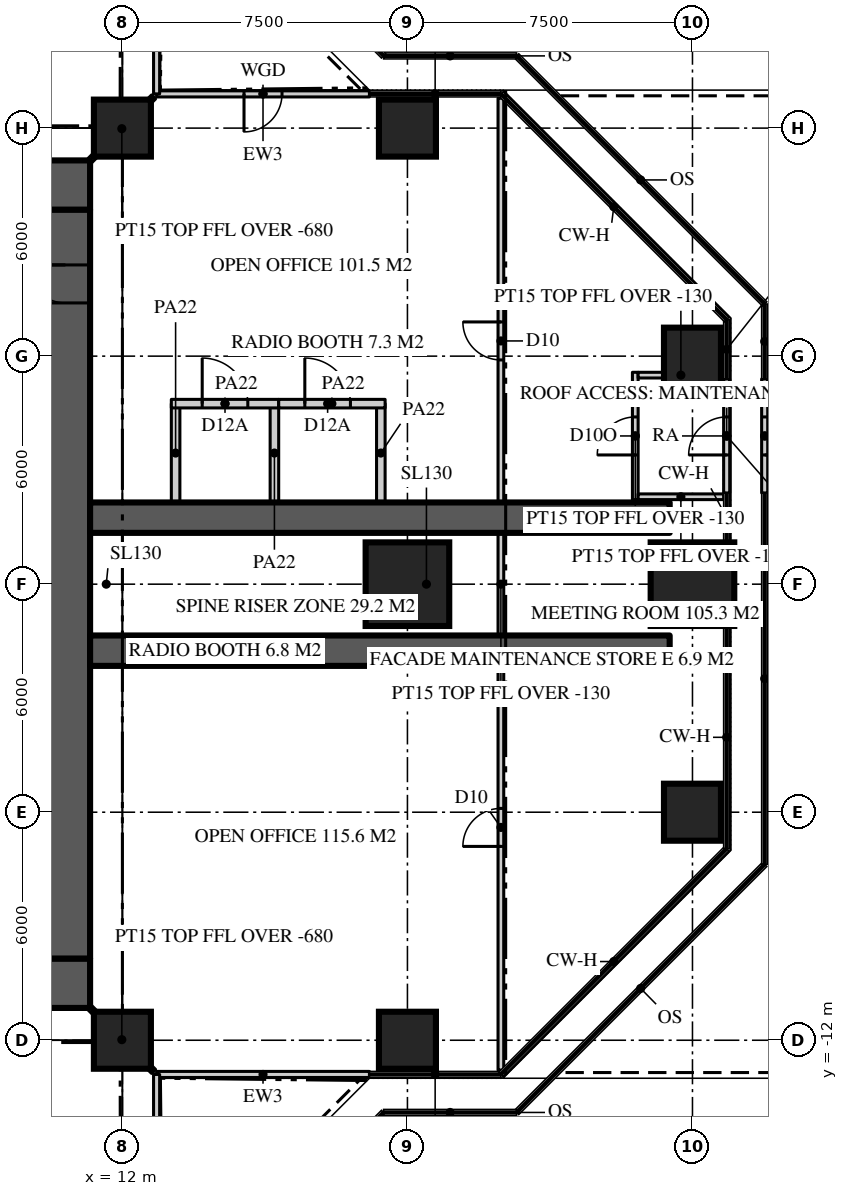
"""IFC4 building model, lengths in metres.
Left out: names, types, materials, properties, quantities, classifications, styles, units other than length and angle.
Written with IfcOpenShell. Run it as: python <this file> out.ifc"""

import sys

from ifc_helpers import new_model, si_unit, direction, frame, frame_2d, origin, origin_2d, place, context, subcontext, project, spatial, rectangle, extrude, element, fill, save


model = new_model("IFC4")
c1 = context("Model", 3, precision=1e-05, world=origin(), true_north=direction((0.0, 1.0)))
c2 = subcontext(c1, "Body", "Model", "MODEL_VIEW")
j1 = project(units=[si_unit("LENGTHUNIT", "METRE"), si_unit("PLANEANGLEUNIT", "RADIAN")], contexts=[c1])
p1 = place(None, origin())
s1 = spatial("IfcSite", under=j1, at=p1, CompositionType="ELEMENT")
p2 = place(p1, origin())
s2 = spatial("IfcBuilding", under=s1, at=p2, CompositionType="ELEMENT")
p3 = place(p2, frame((0.0, 0.0, 204.9)))
s3 = spatial("IfcBuildingStorey", under=s2, at=p3, CompositionType="ELEMENT", Elevation=204.9)
p4 = place(p3, frame((-11.15, 10.5, 0.0), z_axis=(0.0, 0.0, 1.0), x_axis=(1.0, 0.0, 0.0)))
e1 = element("IfcWall", 1, at=p4, inside=s3, PredefinedType="SHEAR", context=c2, shape_type="SweptSolid", body=[
    extrude(rectangle(XDim=22.3, YDim=1.3, at=frame_2d((11.15, 0.0))), origin(), (0.0, 0.0, 1.0), 3.9),
])
p5 = place(p4, frame((4.25, 0.0, 0.0)))
e2 = element("IfcOpeningElement", 2, at=p5, cuts=e1, PredefinedType="OPENING", context=c2, shape_type="SweptSolid", body=[
    extrude(rectangle(XDim=1.8, YDim=2.2, at=frame_2d((0.9, 1.1))), frame((0.0, 0.66, 0.0), z_axis=(0.0, -1.0, 0.0), x_axis=(1.0, 0.0, 0.0)), (0.0, 0.0, 1.0), 1.32),
])
p6 = place(p4, frame((16.25, 0.0, 0.0)))
e3 = element("IfcOpeningElement", 3, at=p6, cuts=e1, PredefinedType="OPENING", context=c2, shape_type="SweptSolid", body=[
    extrude(rectangle(XDim=1.8, YDim=2.2, at=frame_2d((0.9, 1.1))), frame((0.0, 0.66, 0.0), z_axis=(0.0, -1.0, 0.0), x_axis=(1.0, 0.0, 0.0)), (0.0, 0.0, 1.0), 1.32),
])
p7 = place(p3, frame((11.15, -10.5, 0.0), z_axis=(0.0, 0.0, 1.0), x_axis=(-1.0, 0.0, 0.0)))
e4 = element("IfcWall", 4, at=p7, inside=s3, PredefinedType="SHEAR", context=c2, shape_type="SweptSolid", body=[
    extrude(rectangle(XDim=22.3, YDim=1.3, at=frame_2d((11.15, 0.0))), origin(), (0.0, 0.0, 1.0), 3.9),
])
p8 = place(p7, frame((16.25, 0.0, 0.0)))
e5 = element("IfcOpeningElement", 5, at=p8, cuts=e4, PredefinedType="OPENING", context=c2, shape_type="SweptSolid", body=[
    extrude(rectangle(XDim=1.8, YDim=2.2, at=frame_2d((0.9, 1.1))), frame((0.0, 0.66, 0.0), z_axis=(0.0, -1.0, 0.0), x_axis=(1.0, 0.0, 0.0)), (0.0, 0.0, 1.0), 1.32),
])
p9 = place(p7, frame((4.25, 0.0, 0.0)))
e6 = element("IfcOpeningElement", 6, at=p9, cuts=e4, PredefinedType="OPENING", context=c2, shape_type="SweptSolid", body=[
    extrude(rectangle(XDim=1.8, YDim=2.2, at=frame_2d((0.9, 1.1))), frame((0.0, 0.66, 0.0), z_axis=(0.0, -1.0, 0.0), x_axis=(1.0, 0.0, 0.0)), (0.0, 0.0, 1.0), 1.32),
])
p10 = place(p3, frame((10.5, -9.85, 0.0), z_axis=(0.0, 0.0, 1.0), x_axis=(0.0, 1.0, 0.0)))
e7 = element("IfcWall", 7, at=p10, inside=s3, PredefinedType="SHEAR", context=c2, shape_type="SweptSolid", body=[
    extrude(rectangle(XDim=19.7, YDim=1.3, at=frame_2d((9.85, 0.0))), origin(), (0.0, 0.0, 1.0), 3.9),
])
p11 = place(p10, frame((17.25, 0.0, 0.0)))
e8 = element("IfcOpeningElement", 8, at=p11, cuts=e7, PredefinedType="OPENING", context=c2, shape_type="SweptSolid", body=[
    extrude(rectangle(XDim=1.0, YDim=2.2, at=frame_2d((0.5, 1.1))), frame((0.0, 0.66, 0.0), z_axis=(0.0, -1.0, 0.0), x_axis=(1.0, 0.0, 0.0)), (0.0, 0.0, 1.0), 1.32),
])
for number, where, z_axis, x_axis in (
    (9, (11.15, -1.75, 0.0), (0.0, 0.0, 1.0), (1.0, 0.0, 0.0)),
    (10, (11.15, 1.75, 0.0), (0.0, 0.0, 1.0), (1.0, 0.0, 0.0)),
):
    element("IfcWall", number, at=place(p3, frame(where, z_axis=z_axis, x_axis=x_axis)), inside=s3, PredefinedType="SHEAR", context=c2, shape_type="SweptSolid", body=[
        extrude(rectangle(XDim=15.25, YDim=0.8, at=frame_2d((7.625, 0.0))), origin(), (0.0, 0.0, 1.0), 3.9),
    ])
for number, where, z_axis, x_axis in (
    (11, (12.0, -12.0, 0.0), (0.0, 0.0, 1.0), (1.0, 0.0, 0.0)),
    (12, (19.5, -12.0, 0.0), (0.0, 0.0, 1.0), (1.0, 0.0, 0.0)),
):
    element("IfcColumn", number, at=place(p3, frame(where, z_axis=z_axis, x_axis=x_axis)), inside=s3, PredefinedType="COLUMN", context=c2, shape_type="SweptSolid", body=[
        extrude(rectangle(XDim=1.5, YDim=1.5, at=origin_2d()), origin(), (0.0, 0.0, 1.0), 3.9),
    ])
p12 = place(p3, frame((27.0, -6.0, -0.13), z_axis=(0.0, 0.0, 1.0), x_axis=(1.0, 0.0, 0.0)))
e13 = element("IfcColumn", 13, at=p12, inside=s3, PredefinedType="COLUMN", context=c2, shape_type="SweptSolid", body=[
    extrude(rectangle(XDim=1.5, YDim=1.5, at=origin_2d()), origin(), (0.0, 0.0, 1.0), 4.03),
])
for number, where, z_axis, x_axis in (
    (14, (19.5, 0.0, 0.0), (0.0, 0.0, 1.0), (1.0, 0.0, 0.0)),
    (15, (27.0, 0.0, 0.0), (0.0, 0.0, 1.0), (1.0, 0.0, 0.0)),
):
    element("IfcColumn", number, at=place(p3, frame(where, z_axis=z_axis, x_axis=x_axis)), inside=s3, PredefinedType="COLUMN", context=c2, shape_type="SweptSolid", body=[
        extrude(rectangle(XDim=2.2, YDim=2.2, at=origin_2d()), origin(), (0.0, 0.0, 1.0), 3.9),
    ])
p13 = place(p3, frame((27.0, 6.0, -0.13), z_axis=(0.0, 0.0, 1.0), x_axis=(1.0, 0.0, 0.0)))
e16 = element("IfcColumn", 16, at=p13, inside=s3, PredefinedType="COLUMN", context=c2, shape_type="SweptSolid", body=[
    extrude(rectangle(XDim=1.5, YDim=1.5, at=origin_2d()), origin(), (0.0, 0.0, 1.0), 4.03),
])
for number, where, z_axis, x_axis in (
    (17, (12.0, 12.0, 0.0), (0.0, 0.0, 1.0), (1.0, 0.0, 0.0)),
    (18, (19.5, 12.0, 0.0), (0.0, 0.0, 1.0), (1.0, 0.0, 0.0)),
):
    element("IfcColumn", number, at=place(p3, frame(where, z_axis=z_axis, x_axis=x_axis)), inside=s3, PredefinedType="COLUMN", context=c2, shape_type="SweptSolid", body=[
        extrude(rectangle(XDim=1.5, YDim=1.5, at=origin_2d()), origin(), (0.0, 0.0, 1.0), 3.9),
    ])
p14 = place(p3, frame((12.9, -12.9, 0.0), z_axis=(0.0, 0.0, 1.0), x_axis=(1.0, 0.0, 0.0)))
e19 = element("IfcWall", 19, at=p14, inside=s3, PredefinedType="SOLIDWALL", context=c2, shape_type="SweptSolid", body=[
    extrude(rectangle(XDim=5.6, YDim=0.16, at=frame_2d((2.8, 0.0))), origin(), (0.0, 0.0, 1.0), 3.77),
])
p15 = place(p3, frame((27.9, 2.4, 0.0), z_axis=(0.0, 0.0, 1.0), x_axis=(0.0, 1.0, 0.0)))
e20 = element("IfcWall", 20, at=p15, inside=s3, PredefinedType="SOLIDWALL", context=c2, shape_type="SweptSolid", body=[
    extrude(rectangle(XDim=3.0, YDim=0.16, at=frame_2d((1.5, 0.0))), origin(), (0.0, 0.0, 1.0), 3.77),
])
p16 = place(p15, frame((1.0, 0.0, 0.0)))
e21 = element("IfcOpeningElement", 21, at=p16, cuts=e20, PredefinedType="OPENING", context=c2, shape_type="SweptSolid", body=[
    extrude(rectangle(XDim=1.0, YDim=2.2, at=frame_2d((0.5, 1.1))), frame((0.0, 0.09, 0.0), z_axis=(0.0, -1.0, 0.0), x_axis=(1.0, 0.0, 0.0)), (0.0, 0.0, 1.0), 0.18),
])
p17 = place(p3, frame((18.5, 12.9, 0.0), z_axis=(0.0, 0.0, 1.0), x_axis=(-1.0, 0.0, 0.0)))
e22 = element("IfcWall", 22, at=p17, inside=s3, PredefinedType="SOLIDWALL", context=c2, shape_type="SweptSolid", body=[
    extrude(rectangle(XDim=5.6, YDim=0.16, at=frame_2d((2.8, 0.0))), origin(), (0.0, 0.0, 1.0), 3.77),
])
p18 = place(p17, frame((2.3, 0.0, 0.0)))
e23 = element("IfcOpeningElement", 23, at=p18, cuts=e22, PredefinedType="OPENING", context=c2, shape_type="SweptSolid", body=[
    extrude(rectangle(XDim=1.0, YDim=2.2, at=frame_2d((0.5, 1.1))), frame((0.0, 0.09, 0.0), z_axis=(0.0, -1.0, 0.0), x_axis=(1.0, 0.0, 0.0)), (0.0, 0.0, 1.0), 0.18),
])
p19 = place(p3, frame((12.9, 12.9, 0.0), z_axis=(0.0, 0.0, 1.0), x_axis=(0.0, 1.0, 0.0)))
e24 = element("IfcWall", 24, at=p19, inside=s3, PredefinedType="SOLIDWALL", context=c2, shape_type="SweptSolid", body=[
    extrude(rectangle(XDim=5.6, YDim=0.16, at=frame_2d((2.8, 0.0))), origin(), (0.0, 0.0, 1.0), 3.77),
])
p20 = place(p3, frame((12.9, -18.5, 0.0), z_axis=(0.0, 0.0, 1.0), x_axis=(0.0, 1.0, 0.0)))
e25 = element("IfcWall", 25, at=p20, inside=s3, PredefinedType="SOLIDWALL", context=c2, shape_type="SweptSolid", body=[
    extrude(rectangle(XDim=5.6, YDim=0.16, at=frame_2d((2.8, 0.0))), origin(), (0.0, 0.0, 1.0), 3.77),
])
p21 = place(p20, frame((2.3, 0.0, 0.0)))
e26 = element("IfcOpeningElement", 26, at=p21, cuts=e25, PredefinedType="OPENING", context=c2, shape_type="SweptSolid", body=[
    extrude(rectangle(XDim=1.0, YDim=2.2, at=frame_2d((0.5, 1.1))), frame((0.0, 0.09, 0.0), z_axis=(0.0, -1.0, 0.0), x_axis=(1.0, 0.0, 0.0)), (0.0, 0.0, 1.0), 0.18),
])
p22 = place(p3, frame((28.9, 5.4, 0.0), z_axis=(0.0, 0.0, 1.0), x_axis=(0.0, -1.0, 0.0)))
e27 = element("IfcWall", 27, at=p22, inside=s3, PredefinedType="SOLIDWALL", context=c2, shape_type="SweptSolid", body=[
    extrude(rectangle(XDim=3.0, YDim=0.16, at=frame_2d((1.5, 0.0))), origin(), (0.0, 0.0, 1.0), 3.9),
])
p23 = place(p22, frame((1.0, 0.0, 0.0)))
e28 = element("IfcOpeningElement", 28, at=p23, cuts=e27, PredefinedType="OPENING", context=c2, shape_type="SweptSolid", body=[
    extrude(rectangle(XDim=1.0, YDim=2.2, at=frame_2d((0.5, 1.1))), frame((0.0, 0.09, 0.0), z_axis=(0.0, -1.0, 0.0), x_axis=(1.0, 0.0, 0.0)), (0.0, 0.0, 1.0), 0.18),
])
p24 = place(p3, frame((21.959, -12.786, 0.0), z_axis=(0.0, 0.0, 1.0), x_axis=(0.0, 1.0, 0.0)))
e29 = element("IfcWall", 29, at=p24, inside=s3, PredefinedType="PARTITIONING", context=c2, shape_type="SweptSolid", body=[
    extrude(rectangle(XDim=25.573, YDim=0.15, at=frame_2d((12.786, 0.0))), origin(), (0.0, 0.0, 1.0), 3.77),
])
p25 = place(p24, frame((18.687, 0.0, 0.0)))
e30 = element("IfcOpeningElement", 30, at=p25, cuts=e29, PredefinedType="OPENING", context=c2, shape_type="SweptSolid", body=[
    extrude(rectangle(XDim=1.0, YDim=2.2, at=frame_2d((0.5, 1.1))), frame((0.0, 0.085, 0.0), z_axis=(0.0, -1.0, 0.0), x_axis=(1.0, 0.0, 0.0)), (0.0, 0.0, 1.0), 0.17),
])
p26 = place(p24, frame((5.886, 0.0, 0.0)))
e31 = element("IfcOpeningElement", 31, at=p26, cuts=e29, PredefinedType="OPENING", context=c2, shape_type="SweptSolid", body=[
    extrude(rectangle(XDim=1.0, YDim=2.2, at=frame_2d((0.5, 1.1))), frame((0.0, 0.085, 0.0), z_axis=(0.0, -1.0, 0.0), x_axis=(1.0, 0.0, 0.0)), (0.0, 0.0, 1.0), 0.17),
])
for number, where, z_axis, x_axis in (
    (32, (13.4, 2.15, 0.0), (0.0, 0.0, 1.0), (0.0, 1.0, 0.0)),
    (33, (16.0, 2.15, 0.0), (0.0, 0.0, 1.0), (0.0, 1.0, 0.0)),
):
    element("IfcWall", number, at=place(p3, frame(where, z_axis=z_axis, x_axis=x_axis)), inside=s3, PredefinedType="PARTITIONING", context=c2, shape_type="SweptSolid", body=[
        extrude(rectangle(XDim=2.6, YDim=0.225, at=frame_2d((1.3, 0.0))), origin(), (0.0, 0.0, 1.0), 3.77),
    ])
p27 = place(p3, frame((13.288, 4.75, 0.0), z_axis=(0.0, 0.0, 1.0), x_axis=(1.0, 0.0, 0.0)))
e34 = element("IfcWall", 34, at=p27, inside=s3, PredefinedType="PARTITIONING", context=c2, shape_type="SweptSolid", body=[
    extrude(rectangle(XDim=2.825, YDim=0.225, at=frame_2d((1.413, 0.0))), origin(), (0.0, 0.0, 1.0), 3.77),
])
p28 = place(p27, frame((0.812, 0.0, 0.0)))
e35 = element("IfcOpeningElement", 35, at=p28, cuts=e34, PredefinedType="OPENING", context=c2, shape_type="SweptSolid", body=[
    extrude(rectangle(XDim=1.2, YDim=2.2, at=frame_2d((0.6, 1.1))), frame((0.0, 0.123, 0.0), z_axis=(0.0, -1.0, 0.0), x_axis=(1.0, 0.0, 0.0)), (0.0, 0.0, 1.0), 0.245),
])
p29 = place(p3, frame((18.8, 2.15, 0.0), z_axis=(0.0, 0.0, 1.0), x_axis=(0.0, 1.0, 0.0)))
e36 = element("IfcWall", 36, at=p29, inside=s3, PredefinedType="PARTITIONING", context=c2, shape_type="SweptSolid", body=[
    extrude(rectangle(XDim=2.6, YDim=0.225, at=frame_2d((1.3, 0.0))), origin(), (0.0, 0.0, 1.0), 3.77),
])
p30 = place(p3, frame((16.113, 4.75, 0.0), z_axis=(0.0, 0.0, 1.0), x_axis=(1.0, 0.0, 0.0)))
e37 = element("IfcWall", 37, at=p30, inside=s3, PredefinedType="PARTITIONING", context=c2, shape_type="SweptSolid", body=[
    extrude(rectangle(XDim=2.8, YDim=0.225, at=frame_2d((1.4, 0.0))), origin(), (0.0, 0.0, 1.0), 3.77),
])
p31 = place(p30, frame((0.688, 0.0, 0.0)))
e38 = element("IfcOpeningElement", 38, at=p31, cuts=e37, PredefinedType="OPENING", context=c2, shape_type="SweptSolid", body=[
    extrude(rectangle(XDim=1.2, YDim=2.2, at=frame_2d((0.6, 1.1))), frame((0.0, 0.123, 0.0), z_axis=(0.0, -1.0, 0.0), x_axis=(1.0, 0.0, 0.0)), (0.0, 0.0, 1.0), 0.245),
])
p32 = place(p3, frame((25.495, 2.225, 0.0), z_axis=(0.0, 0.0, 1.0), x_axis=(0.0, 1.0, 0.0)))
e39 = element("IfcWall", 39, at=p32, inside=s3, PredefinedType="PARTITIONING", context=c2, shape_type="SweptSolid", body=[
    extrude(rectangle(XDim=3.35, YDim=0.15, at=frame_2d((1.675, 0.0))), origin(), (0.0, 0.0, 1.0), 3.77),
])
p33 = place(p32, frame((1.175, 0.0, 0.0)))
e40 = element("IfcOpeningElement", 40, at=p33, cuts=e39, PredefinedType="OPENING", context=c2, shape_type="SweptSolid", body=[
    extrude(rectangle(XDim=1.0, YDim=2.2, at=frame_2d((0.5, 1.1))), frame((0.0, 0.085, 0.0), z_axis=(0.0, -1.0, 0.0), x_axis=(1.0, 0.0, 0.0)), (0.0, 0.0, 1.0), 0.17),
])
for number, where, z_axis, x_axis in (
    (41, (25.57, 2.3, 0.0), (0.0, 0.0, 1.0), (1.0, 0.0, 0.0)),
    (42, (25.57, 5.5, 0.0), (0.0, 0.0, 1.0), (1.0, 0.0, 0.0)),
):
    element("IfcWall", number, at=place(p3, frame(where, z_axis=z_axis, x_axis=x_axis)), inside=s3, PredefinedType="PARTITIONING", context=c2, shape_type="SweptSolid", body=[
        extrude(rectangle(XDim=2.25, YDim=0.15, at=frame_2d((1.125, 0.0))), origin(), (0.0, 0.0, 1.0), 3.77),
    ])
for number, where, z_axis, x_axis in (
    (43, (11.15, 11.15, 0.0), (0.0, 0.0, 1.0), (0.707, 0.707, 0.0)),
    (44, (11.15, -11.15, 0.0), (0.0, 0.0, 1.0), (0.707, -0.707, 0.0)),
):
    element("IfcWall", number, at=place(p3, frame(where, z_axis=z_axis, x_axis=x_axis)), inside=s3, PredefinedType="PARTITIONING", context=c2, shape_type="SweptSolid", body=[
        extrude(rectangle(XDim=2.362, YDim=0.15, at=frame_2d((1.181, 0.0))), origin(), (0.0, 0.0, 1.0), 3.22),
    ])
p34 = place(p16, origin())
e45 = element("IfcDoor", 45, at=p34, inside=s3, OperationType="SINGLE_SWING_LEFT", PredefinedType="DOOR", context=c2, shape_type="SweptSolid", body=[
    extrude(rectangle(XDim=1.0, YDim=2.2, at=frame_2d((0.5, 1.1))), frame((0.0, 0.025, 0.0), z_axis=(0.0, -1.0, 0.0), x_axis=(1.0, 0.0, 0.0)), (0.0, 0.0, 1.0), 0.05),
])
fill(e21, e45)
p35 = place(p18, origin())
e46 = element("IfcDoor", 46, at=p35, inside=s3, OperationType="SINGLE_SWING_RIGHT", PredefinedType="DOOR", context=c2, shape_type="SweptSolid", body=[
    extrude(rectangle(XDim=1.0, YDim=2.2, at=frame_2d((0.5, 1.1))), frame((0.0, 0.025, 0.0), z_axis=(0.0, -1.0, 0.0), x_axis=(1.0, 0.0, 0.0)), (0.0, 0.0, 1.0), 0.05),
])
fill(e23, e46)
p36 = place(p23, origin())
e47 = element("IfcDoor", 47, at=p36, inside=s3, OperationType="SINGLE_SWING_RIGHT", PredefinedType="DOOR", context=c2, shape_type="SweptSolid", body=[
    extrude(rectangle(XDim=1.0, YDim=2.2, at=frame_2d((0.5, 1.1))), frame((0.0, 0.025, 0.0), z_axis=(0.0, -1.0, 0.0), x_axis=(1.0, 0.0, 0.0)), (0.0, 0.0, 1.0), 0.05),
])
fill(e28, e47)
p37 = place(p11, origin())
e48 = element("IfcDoor", 48, at=p37, inside=s3, OperationType="SINGLE_SWING_RIGHT", PredefinedType="DOOR", context=c2, shape_type="SweptSolid", body=[
    extrude(rectangle(XDim=1.0, YDim=2.2, at=frame_2d((0.5, 1.1))), frame((0.0, 0.025, 0.0), z_axis=(0.0, -1.0, 0.0), x_axis=(1.0, 0.0, 0.0)), (0.0, 0.0, 1.0), 0.05),
])
fill(e8, e48)
p38 = place(p25, origin())
e49 = element("IfcDoor", 49, at=p38, inside=s3, OperationType="SINGLE_SWING_RIGHT", PredefinedType="DOOR", context=c2, shape_type="SweptSolid", body=[
    extrude(rectangle(XDim=1.0, YDim=2.2, at=frame_2d((0.5, 1.1))), frame((0.0, 0.025, 0.0), z_axis=(0.0, -1.0, 0.0), x_axis=(1.0, 0.0, 0.0)), (0.0, 0.0, 1.0), 0.05),
])
fill(e30, e49)
p39 = place(p26, origin())
e50 = element("IfcDoor", 50, at=p39, inside=s3, OperationType="SINGLE_SWING_LEFT", PredefinedType="DOOR", context=c2, shape_type="SweptSolid", body=[
    extrude(rectangle(XDim=1.0, YDim=2.2, at=frame_2d((0.5, 1.1))), frame((0.0, 0.025, 0.0), z_axis=(0.0, -1.0, 0.0), x_axis=(1.0, 0.0, 0.0)), (0.0, 0.0, 1.0), 0.05),
])
fill(e31, e50)
p40 = place(p28, origin())
e51 = element("IfcDoor", 51, at=p40, inside=s3, OperationType="SINGLE_SWING_LEFT", PredefinedType="DOOR", context=c2, shape_type="SweptSolid", body=[
    extrude(rectangle(XDim=1.2, YDim=2.2, at=frame_2d((0.6, 1.1))), frame((0.0, 0.025, 0.0), z_axis=(0.0, -1.0, 0.0), x_axis=(1.0, 0.0, 0.0)), (0.0, 0.0, 1.0), 0.05),
])
fill(e35, e51)
p41 = place(p31, origin())
e52 = element("IfcDoor", 52, at=p41, inside=s3, OperationType="SINGLE_SWING_LEFT", PredefinedType="DOOR", context=c2, shape_type="SweptSolid", body=[
    extrude(rectangle(XDim=1.2, YDim=2.2, at=frame_2d((0.6, 1.1))), frame((0.0, 0.025, 0.0), z_axis=(0.0, -1.0, 0.0), x_axis=(1.0, 0.0, 0.0)), (0.0, 0.0, 1.0), 0.05),
])
fill(e38, e52)
p42 = place(p33, origin())
e53 = element("IfcDoor", 53, at=p42, inside=s3, OperationType="SINGLE_SWING_LEFT", PredefinedType="DOOR", context=c2, shape_type="SweptSolid", body=[
    extrude(rectangle(XDim=1.0, YDim=2.2, at=frame_2d((0.5, 1.1))), frame((0.0, 0.025, 0.0), z_axis=(0.0, -1.0, 0.0), x_axis=(1.0, 0.0, 0.0)), (0.0, 0.0, 1.0), 0.05),
])
fill(e40, e53)
save(model, sys.argv[1])
